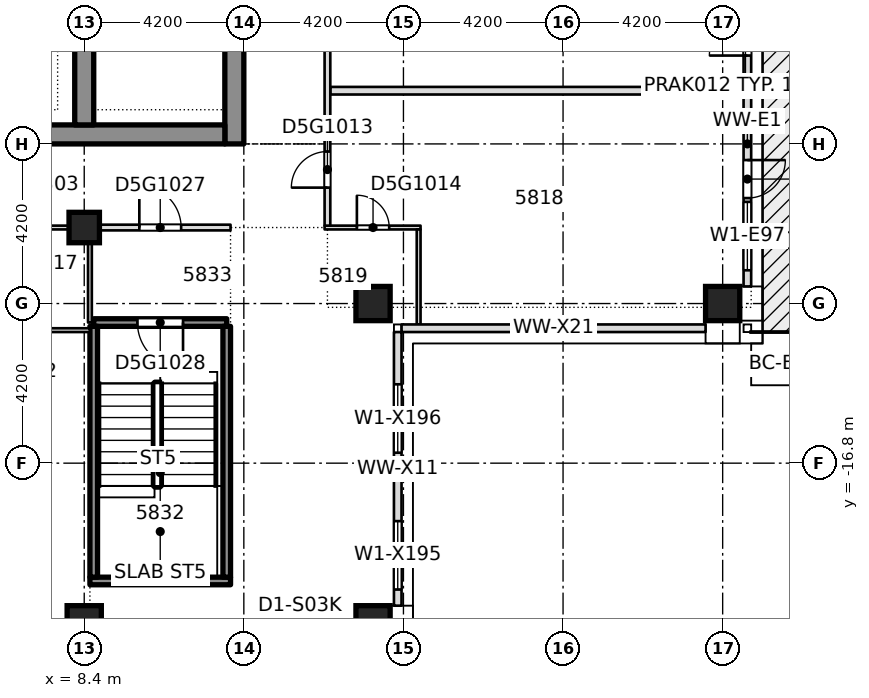
"""IFC4 building model, lengths in metres.
Left out: names, types, materials, properties, quantities, classifications, styles, units other than length and angle.
Written with IfcOpenShell. Run it as: python <this file> out.ifc"""

import sys

from ifc_helpers import new_model, si_unit, direction, frame, frame_2d, origin, origin_2d, place, context, subcontext, project, spatial, rectangle, extrude, element, fill, save


model = new_model("IFC4")
c1 = context("Model", 3, precision=1e-05, world=origin(), true_north=direction((0.0, 1.0)))
c2 = subcontext(c1, "Body", "Model", "MODEL_VIEW")
j1 = project(units=[si_unit("LENGTHUNIT", "METRE"), si_unit("PLANEANGLEUNIT", "RADIAN")], contexts=[c1])
p1 = place(None, origin())
s1 = spatial("IfcSite", under=j1, at=p1, CompositionType="ELEMENT")
p2 = place(p1, origin())
s2 = spatial("IfcBuilding", under=s1, at=p2, CompositionType="ELEMENT")
p3 = place(p2, frame((0.0, 0.0, 223.45)))
s3 = spatial("IfcBuildingStorey", under=s2, at=p3, CompositionType="ELEMENT", Elevation=223.45)
p4 = place(p3, frame((12.35, -8.4, -0.4), z_axis=(0.0, 0.0, 1.0), x_axis=(0.0, 1.0, 0.0)))
e1 = element("IfcWall", 1, at=p4, inside=s3, PredefinedType="SHEAR", context=c2, shape_type="SweptSolid", body=[
    extrude(rectangle(XDim=30.15, YDim=0.5, at=frame_2d((15.075, 0.0))), origin(), (0.0, 0.0, 1.0), 3.45),
])
p5 = place(p4, frame((4.113, 0.0, 0.4)))
e2 = element("IfcOpeningElement", 2, at=p5, cuts=e1, PredefinedType="OPENING", context=c2, shape_type="SweptSolid", body=[
    extrude(rectangle(XDim=0.95, YDim=2.1, at=frame_2d((0.475, 1.05))), frame((0.0, 0.26, 0.0), z_axis=(0.0, -1.0, 0.0), x_axis=(1.0, 0.0, 0.0)), (0.0, 0.0, 1.0), 0.52),
])
p6 = place(p4, frame((9.89, 0.0, 0.4)))
e3 = element("IfcOpeningElement", 3, at=p6, cuts=e1, PredefinedType="OPENING", context=c2, shape_type="SweptSolid", body=[
    extrude(rectangle(XDim=0.95, YDim=2.1, at=frame_2d((0.475, 1.05))), frame((0.0, 0.26, 0.0), z_axis=(0.0, -1.0, 0.0), x_axis=(1.0, 0.0, 0.0)), (0.0, 0.0, 1.0), 0.52),
])
p7 = place(p4, frame((15.052, 0.0, 0.4)))
e4 = element("IfcOpeningElement", 4, at=p7, cuts=e1, PredefinedType="OPENING", context=c2, shape_type="SweptSolid", body=[
    extrude(rectangle(XDim=0.95, YDim=2.1, at=frame_2d((0.475, 1.05))), frame((0.0, 0.26, 0.0), z_axis=(0.0, -1.0, 0.0), x_axis=(1.0, 0.0, 0.0)), (0.0, 0.0, 1.0), 0.52),
])
p8 = place(p4, frame((22.144, 0.0, 0.4)))
e5 = element("IfcOpeningElement", 5, at=p8, cuts=e1, PredefinedType="OPENING", context=c2, shape_type="SweptSolid", body=[
    extrude(rectangle(XDim=0.95, YDim=2.1, at=frame_2d((0.475, 1.05))), frame((0.0, 0.26, 0.0), z_axis=(0.0, -1.0, 0.0), x_axis=(1.0, 0.0, 0.0)), (0.0, 0.0, 1.0), 0.52),
])
p9 = place(p4, frame((24.998, 0.0, 0.4)))
e6 = element("IfcOpeningElement", 6, at=p9, cuts=e1, PredefinedType="OPENING", context=c2, shape_type="SweptSolid", body=[
    extrude(rectangle(XDim=0.95, YDim=2.1, at=frame_2d((0.475, 1.05))), frame((0.0, 0.26, 0.0), z_axis=(0.0, -1.0, 0.0), x_axis=(1.0, 0.0, 0.0)), (0.0, 0.0, 1.0), 0.52),
])
p10 = place(p4, frame((27.605, 0.0, 0.4)))
e7 = element("IfcOpeningElement", 7, at=p10, cuts=e1, PredefinedType="OPENING", context=c2, shape_type="SweptSolid", body=[
    extrude(rectangle(XDim=0.95, YDim=2.1, at=frame_2d((0.475, 1.05))), frame((0.0, 0.26, 0.0), z_axis=(0.0, -1.0, 0.0), x_axis=(1.0, 0.0, 0.0)), (0.0, 0.0, 1.0), 0.52),
])
p11 = place(p4, frame((19.3, 0.0, 0.4)))
e8 = element("IfcOpeningElement", 8, at=p11, cuts=e1, PredefinedType="OPENING", context=c2, shape_type="SweptSolid", body=[
    extrude(rectangle(XDim=1.2, YDim=2.1, at=frame_2d((0.6, 1.05))), frame((0.0, 0.26, 0.0), z_axis=(0.0, -1.0, 0.0), x_axis=(1.0, 0.0, 0.0)), (0.0, 0.0, 1.0), 0.52),
])
p12 = place(p3, frame((-12.1, -8.15, -0.4), z_axis=(0.0, 0.0, 1.0), x_axis=(1.0, 0.0, 0.0)))
e9 = element("IfcWall", 9, at=p12, inside=s3, PredefinedType="SHEAR", context=c2, shape_type="SweptSolid", body=[
    extrude(rectangle(XDim=24.2, YDim=0.5, at=frame_2d((12.1, 0.0))), origin(), (0.0, 0.0, 1.0), 3.45),
])
p13 = place(p12, frame((7.35, 0.0, 0.4)))
e10 = element("IfcOpeningElement", 10, at=p13, cuts=e9, PredefinedType="OPENING", context=c2, shape_type="SweptSolid", body=[
    extrude(rectangle(XDim=1.8, YDim=2.1, at=frame_2d((0.9, 1.05))), frame((0.0, 0.26, 0.0), z_axis=(0.0, -1.0, 0.0), x_axis=(1.0, 0.0, 0.0)), (0.0, 0.0, 1.0), 0.52),
])
p14 = place(p12, frame((15.05, 0.0, 0.4)))
e11 = element("IfcOpeningElement", 11, at=p14, cuts=e9, PredefinedType="OPENING", context=c2, shape_type="SweptSolid", body=[
    extrude(rectangle(XDim=1.8, YDim=2.1, at=frame_2d((0.9, 1.05))), frame((0.0, 0.26, 0.0), z_axis=(0.0, -1.0, 0.0), x_axis=(1.0, 0.0, 0.0)), (0.0, 0.0, 1.0), 0.52),
])
p15 = place(p3, frame((8.4, -7.9, -0.4), z_axis=(0.0, 0.0, 1.0), x_axis=(0.0, 1.0, 0.0)))
e12 = element("IfcWall", 12, at=p15, inside=s3, PredefinedType="SHEAR", context=c2, shape_type="SweptSolid", body=[
    extrude(rectangle(XDim=29.15, YDim=0.5, at=frame_2d((14.575, 0.0))), origin(), (0.0, 0.0, 1.0), 3.45),
])
p16 = place(p15, frame((18.8, 0.0, 0.4)))
e13 = element("IfcOpeningElement", 13, at=p16, cuts=e12, PredefinedType="OPENING", context=c2, shape_type="SweptSolid", body=[
    extrude(rectangle(XDim=1.2, YDim=2.1, at=frame_2d((0.6, 1.05))), frame((0.0, 0.26, 0.0), z_axis=(0.0, -1.0, 0.0), x_axis=(1.0, 0.0, 0.0)), (0.0, 0.0, 1.0), 0.52),
])
for number, where, z_axis, x_axis in (
    (14, (8.4, -21.0, -0.4), (0.0, 0.0, 1.0), (1.0, 0.0, 0.0)),
    (15, (16.0, -21.0, -0.4), (0.0, 0.0, 1.0), (1.0, 0.0, 0.0)),
    (16, (16.0, -12.6, -0.4), (0.0, 0.0, 1.0), (1.0, 0.0, 0.0)),
    (17, (25.2, -12.6, -0.4), (0.0, 0.0, 1.0), (1.0, 0.0, 0.0)),
):
    element("IfcColumn", number, at=place(p3, frame(where, z_axis=z_axis, x_axis=x_axis)), inside=s3, PredefinedType="COLUMN", context=c2, shape_type="SweptSolid", body=[
        extrude(rectangle(XDim=0.9, YDim=0.9, at=origin_2d()), origin(), (0.0, 0.0, 1.0), 3.45),
    ])
p17 = place(p3, frame((8.4, -10.6, -0.4), z_axis=(0.0, 0.0, 1.0), x_axis=(1.0, 0.0, 0.0)))
e18 = element("IfcColumn", 18, at=p17, inside=s3, PredefinedType="COLUMN", context=c2, shape_type="SweptSolid", body=[
    extrude(rectangle(XDim=0.8, YDim=0.8, at=origin_2d()), origin(), (0.0, 0.0, 1.0), 3.45),
])
p18 = place(p3, frame((5.802, -13.3, 0.0), z_axis=(0.0, 0.0, 1.0), x_axis=(1.0, 0.0, 0.0)))
e19 = element("IfcWall", 19, at=p18, inside=s3, PredefinedType="PARTITIONING", context=c2, shape_type="SweptSolid", body=[
    extrude(rectangle(XDim=2.748, YDim=0.1, at=frame_2d((1.374, 0.0))), origin(), (0.0, 0.0, 1.0), 3.05),
])
p19 = place(p18, frame((0.248, 0.0, 0.0)))
e20 = element("IfcOpeningElement", 20, at=p19, cuts=e19, PredefinedType="OPENING", context=c2, shape_type="SweptSolid", body=[
    extrude(rectangle(XDim=0.85, YDim=2.1, at=frame_2d((0.425, 1.05))), frame((0.0, 0.06, 0.0), z_axis=(0.0, -1.0, 0.0), x_axis=(1.0, 0.0, 0.0)), (0.0, 0.0, 1.0), 0.12),
])
p20 = place(p3, frame((8.65, -13.1, 0.0), z_axis=(0.0, 0.0, 1.0), x_axis=(1.0, 0.0, 0.0)))
e21 = element("IfcWall", 21, at=p20, inside=s3, PredefinedType="SOLIDWALL", context=c2, shape_type="SweptSolid", body=[
    extrude(rectangle(XDim=3.5, YDim=0.2, at=frame_2d((1.75, 0.0))), origin(), (0.0, 0.0, 1.0), 3.05),
])
p21 = place(p20, frame((1.15, 0.0, 0.0)))
e22 = element("IfcOpeningElement", 22, at=p21, cuts=e21, PredefinedType="OPENING", context=c2, shape_type="SweptSolid", body=[
    extrude(rectangle(XDim=1.2, YDim=2.1, at=frame_2d((0.6, 1.05))), frame((0.0, 0.11, 0.0), z_axis=(0.0, -1.0, 0.0), x_axis=(1.0, 0.0, 0.0)), (0.0, 0.0, 1.0), 0.22),
])
p22 = place(p3, frame((5.8, -10.6, 0.0), z_axis=(0.0, 0.0, 1.0), x_axis=(1.0, 0.0, 0.0)))
e23 = element("IfcWall", 23, at=p22, inside=s3, PredefinedType="PARTITIONING", context=c2, shape_type="SweptSolid", body=[
    extrude(rectangle(XDim=2.8, YDim=0.1, at=frame_2d((1.4, 0.0))), origin(), (0.0, 0.0, 1.0), 3.05),
])
p23 = place(p3, frame((8.5, -10.6, 0.0), z_axis=(0.0, 0.0, 1.0), x_axis=(1.0, 0.0, 0.0)))
e24 = element("IfcWall", 24, at=p23, inside=s3, PredefinedType="PARTITIONING", context=c2, shape_type="SweptSolid", body=[
    extrude(rectangle(XDim=3.75, YDim=0.15, at=frame_2d((1.875, 0.0))), origin(), (0.0, 0.0, 1.0), 3.05),
])
p24 = place(p23, frame((1.35, 0.0, 0.0)))
e25 = element("IfcOpeningElement", 25, at=p24, cuts=e24, PredefinedType="OPENING", context=c2, shape_type="SweptSolid", body=[
    extrude(rectangle(XDim=1.1, YDim=2.1, at=frame_2d((0.55, 1.05))), frame((0.0, 0.085, 0.0), z_axis=(0.0, -1.0, 0.0), x_axis=(1.0, 0.0, 0.0)), (0.0, 0.0, 1.0), 0.17),
])
p25 = place(p3, frame((14.725, -10.6, 0.0), z_axis=(0.0, 0.0, 1.0), x_axis=(1.0, 0.0, 0.0)))
e26 = element("IfcWall", 26, at=p25, inside=s3, PredefinedType="PARTITIONING", context=c2, shape_type="SweptSolid", body=[
    extrude(rectangle(XDim=2.525, YDim=0.1, at=frame_2d((1.262, 0.0))), origin(), (0.0, 0.0, 1.0), 3.05),
])
p26 = place(p25, frame((0.85, 0.0, 0.0)))
e27 = element("IfcOpeningElement", 27, at=p26, cuts=e26, PredefinedType="OPENING", context=c2, shape_type="SweptSolid", body=[
    extrude(rectangle(XDim=0.85, YDim=2.1, at=frame_2d((0.425, 1.05))), frame((0.0, 0.06, 0.0), z_axis=(0.0, -1.0, 0.0), x_axis=(1.0, 0.0, 0.0)), (0.0, 0.0, 1.0), 0.12),
])
p27 = place(p3, frame((14.875, -7.0, 0.0), z_axis=(0.0, 0.0, 1.0), x_axis=(1.0, 0.0, 0.0)))
e28 = element("IfcWall", 28, at=p27, inside=s3, PredefinedType="PARTITIONING", context=c2, shape_type="SweptSolid", body=[
    extrude(rectangle(XDim=10.875, YDim=0.2, at=frame_2d((5.438, 0.0))), origin(), (0.0, 0.0, 1.0), 3.05),
])
p28 = place(p3, frame((8.55, -13.1, 0.0), z_axis=(0.0, 0.0, 1.0), x_axis=(0.0, 1.0, 0.0)))
e29 = element("IfcWall", 29, at=p28, inside=s3, PredefinedType="PARTITIONING", context=c2, shape_type="SweptSolid", body=[
    extrude(rectangle(XDim=2.425, YDim=0.1, at=frame_2d((1.212, 0.0))), origin(), (0.0, 0.0, 1.0), 3.05),
])
p29 = place(p3, frame((14.8, -10.55, 0.0), z_axis=(0.0, 0.0, 1.0), x_axis=(0.0, 1.0, 0.0)))
e30 = element("IfcWall", 30, at=p29, inside=s3, PredefinedType="PARTITIONING", context=c2, shape_type="SweptSolid", body=[
    extrude(rectangle(XDim=20.975, YDim=0.15, at=frame_2d((10.488, 0.0))), origin(), (0.0, 0.0, 1.0), 3.05),
])
p30 = place(p29, frame((1.0, 0.0, 0.0)))
e31 = element("IfcOpeningElement", 31, at=p30, cuts=e30, PredefinedType="OPENING", context=c2, shape_type="SweptSolid", body=[
    extrude(rectangle(XDim=0.95, YDim=2.1, at=frame_2d((0.475, 1.05))), frame((0.0, 0.085, 0.0), z_axis=(0.0, -1.0, 0.0), x_axis=(1.0, 0.0, 0.0)), (0.0, 0.0, 1.0), 0.17),
])
p31 = place(p29, frame((17.0, 0.0, 0.0)))
e32 = element("IfcOpeningElement", 32, at=p31, cuts=e30, PredefinedType="OPENING", context=c2, shape_type="SweptSolid", body=[
    extrude(rectangle(XDim=1.0, YDim=2.1, at=frame_2d((0.5, 1.05))), frame((0.0, 0.085, 0.0), z_axis=(0.0, -1.0, 0.0), x_axis=(1.0, 0.0, 0.0)), (0.0, 0.0, 1.0), 0.17),
])
p32 = place(p29, frame((10.0, 0.0, 0.0)))
e33 = element("IfcOpeningElement", 33, at=p32, cuts=e30, PredefinedType="OPENING", context=c2, shape_type="SweptSolid", body=[
    extrude(rectangle(XDim=1.1, YDim=2.1, at=frame_2d((0.55, 1.05))), frame((0.0, 0.085, 0.0), z_axis=(0.0, -1.0, 0.0), x_axis=(1.0, 0.0, 0.0)), (0.0, 0.0, 1.0), 0.17),
])
p33 = place(p29, frame((4.85, 0.0, 0.0)))
e34 = element("IfcOpeningElement", 34, at=p33, cuts=e30, PredefinedType="OPENING", context=c2, shape_type="SweptSolid", body=[
    extrude(rectangle(XDim=1.0, YDim=2.1, at=frame_2d((0.5, 1.05))), frame((0.0, 0.085, 0.0), z_axis=(0.0, -1.0, 0.0), x_axis=(1.0, 0.0, 0.0)), (0.0, 0.0, 1.0), 0.17),
])
p34 = place(p3, frame((17.2, -13.15, 0.0), z_axis=(0.0, 0.0, 1.0), x_axis=(0.0, 1.0, 0.0)))
e35 = element("IfcWall", 35, at=p34, inside=s3, PredefinedType="PARTITIONING", context=c2, shape_type="SweptSolid", body=[
    extrude(rectangle(XDim=2.5, YDim=0.1, at=frame_2d((1.25, 0.0))), origin(), (0.0, 0.0, 1.0), 3.05),
])
p35 = place(p3, frame((16.65, -20.55, 0.0), z_axis=(0.0, 0.0, 1.0), x_axis=(0.0, 1.0, 0.0)))
e36 = element("IfcWall", 36, at=p35, inside=s3, PredefinedType="STANDARD", context=c2, shape_type="SweptSolid", body=[
    extrude(rectangle(XDim=7.2, YDim=0.2, at=frame_2d((3.6, 0.0))), origin(), (0.0, 0.0, 1.0), 3.05),
])
p36 = place(p35, frame((0.425, 0.0, 0.2)))
e37 = element("IfcOpeningElement", 37, at=p36, cuts=e36, PredefinedType="OPENING", context=c2, shape_type="SweptSolid", body=[
    extrude(rectangle(XDim=1.8, YDim=2.65, at=frame_2d((0.9, 1.325))), frame((0.0, 0.11, 0.0), z_axis=(0.0, -1.0, 0.0), x_axis=(1.0, 0.0, 0.0)), (0.0, 0.0, 1.0), 0.22),
])
p37 = place(p35, frame((4.025, 0.0, 0.2)))
e38 = element("IfcOpeningElement", 38, at=p37, cuts=e36, PredefinedType="OPENING", context=c2, shape_type="SweptSolid", body=[
    extrude(rectangle(XDim=1.8, YDim=2.65, at=frame_2d((0.9, 1.325))), frame((0.0, 0.11, 0.0), z_axis=(0.0, -1.0, 0.0), x_axis=(1.0, 0.0, 0.0)), (0.0, 0.0, 1.0), 0.22),
])
p38 = place(p3, frame((16.75, -13.25, 0.0), z_axis=(0.0, 0.0, 1.0), x_axis=(1.0, 0.0, 0.0)))
e39 = element("IfcWall", 39, at=p38, inside=s3, PredefinedType="STANDARD", context=c2, shape_type="SweptSolid", body=[
    extrude(rectangle(XDim=8.0, YDim=0.2, at=frame_2d((4.0, 0.0))), origin(), (0.0, 0.0, 1.0), 3.05),
])
p39 = place(p3, frame((25.85, -12.15, 0.0), z_axis=(0.0, 0.0, 1.0), x_axis=(0.0, 1.0, 0.0)))
e40 = element("IfcWall", 40, at=p39, inside=s3, PredefinedType="STANDARD", context=c2, shape_type="SweptSolid", body=[
    extrude(rectangle(XDim=7.5, YDim=0.2, at=frame_2d((3.75, 0.0))), origin(), (0.0, 0.0, 1.0), 3.05),
])
p40 = place(p39, frame((0.425, 0.0, 0.2)))
e41 = element("IfcOpeningElement", 41, at=p40, cuts=e40, PredefinedType="OPENING", context=c2, shape_type="SweptSolid", body=[
    extrude(rectangle(XDim=1.8, YDim=2.65, at=frame_2d((0.9, 1.325))), frame((0.0, 0.11, 0.0), z_axis=(0.0, -1.0, 0.0), x_axis=(1.0, 0.0, 0.0)), (0.0, 0.0, 1.0), 0.22),
])
p41 = place(p39, frame((2.325, 0.0, 0.0)))
e42 = element("IfcOpeningElement", 42, at=p41, cuts=e40, PredefinedType="OPENING", context=c2, shape_type="SweptSolid", body=[
    extrude(rectangle(XDim=1.0, YDim=2.4, at=frame_2d((0.5, 1.2))), frame((0.0, 0.11, 0.0), z_axis=(0.0, -1.0, 0.0), x_axis=(1.0, 0.0, 0.0)), (0.0, 0.0, 1.0), 0.22),
])
p42 = place(p39, frame((6.075, 0.0, 0.0)))
e43 = element("IfcOpeningElement", 43, at=p42, cuts=e40, PredefinedType="OPENING", context=c2, shape_type="SweptSolid", body=[
    extrude(rectangle(XDim=1.0, YDim=2.4, at=frame_2d((0.5, 1.2))), frame((0.0, 0.11, 0.0), z_axis=(0.0, -1.0, 0.0), x_axis=(1.0, 0.0, 0.0)), (0.0, 0.0, 1.0), 0.22),
])
p43 = place(p3, frame((8.55, -19.9, 0.0), z_axis=(0.0, 0.0, 1.0), x_axis=(1.0, 0.0, 0.0)))
e44 = element("IfcWall", 44, at=p43, inside=s3, PredefinedType="SOLIDWALL", context=c2, shape_type="SweptSolid", body=[
    extrude(rectangle(XDim=3.7, YDim=0.2, at=frame_2d((1.85, 0.0))), origin(), (0.0, 0.0, 1.0), 3.05),
])
for number, where, z_axis, x_axis in (
    (45, (8.65, -19.8, 0.0), (0.0, 0.0, 1.0), (0.0, 1.0, 0.0)),
    (46, (12.15, -19.8, 0.0), (0.0, 0.0, 1.0), (0.0, 1.0, 0.0)),
):
    element("IfcWall", number, at=place(p3, frame(where, z_axis=z_axis, x_axis=x_axis)), inside=s3, PredefinedType="SOLIDWALL", context=c2, shape_type="SweptSolid", body=[
        extrude(rectangle(XDim=6.6, YDim=0.2, at=frame_2d((3.3, 0.0))), origin(), (0.0, 0.0, 1.0), 3.05),
    ])
p44 = place(p30, origin())
e47 = element("IfcDoor", 47, at=p44, inside=s3, OperationType="SINGLE_SWING_RIGHT", PredefinedType="DOOR", context=c2, shape_type="SweptSolid", body=[
    extrude(rectangle(XDim=0.95, YDim=2.1, at=frame_2d((0.475, 1.05))), frame((0.0, 0.025, 0.0), z_axis=(0.0, -1.0, 0.0), x_axis=(1.0, 0.0, 0.0)), (0.0, 0.0, 1.0), 0.05),
])
fill(e31, e47)
p45 = place(p26, origin())
e48 = element("IfcDoor", 48, at=p45, inside=s3, OperationType="SINGLE_SWING_RIGHT", PredefinedType="DOOR", context=c2, shape_type="SweptSolid", body=[
    extrude(rectangle(XDim=0.85, YDim=2.1, at=frame_2d((0.425, 1.05))), frame((0.0, 0.025, 0.0), z_axis=(0.0, -1.0, 0.0), x_axis=(1.0, 0.0, 0.0)), (0.0, 0.0, 1.0), 0.05),
])
fill(e27, e48)
p46 = place(p24, origin())
e49 = element("IfcDoor", 49, at=p46, inside=s3, OperationType="SINGLE_SWING_RIGHT", PredefinedType="DOOR", context=c2, shape_type="SweptSolid", body=[
    extrude(rectangle(XDim=1.1, YDim=2.1, at=frame_2d((0.55, 1.05))), frame((0.0, 0.025, 0.0), z_axis=(0.0, -1.0, 0.0), x_axis=(1.0, 0.0, 0.0)), (0.0, 0.0, 1.0), 0.05),
])
fill(e25, e49)
p47 = place(p21, origin())
e50 = element("IfcDoor", 50, at=p47, inside=s3, OperationType="SINGLE_SWING_RIGHT", PredefinedType="DOOR", context=c2, shape_type="SweptSolid", body=[
    extrude(rectangle(XDim=1.2, YDim=2.1, at=frame_2d((0.6, 1.05))), frame((0.0, 0.025, 0.0), z_axis=(0.0, -1.0, 0.0), x_axis=(1.0, 0.0, 0.0)), (0.0, 0.0, 1.0), 0.05),
])
fill(e22, e50)
p48 = place(p36, origin())
e51 = element("IfcWindow", 51, at=p48, inside=s3, PartitioningType="SINGLE_PANEL", PredefinedType="WINDOW", context=c2, shape_type="SweptSolid", body=[
    extrude(rectangle(XDim=1.8, YDim=2.65, at=frame_2d((0.9, 1.325))), frame((0.0, 0.03, 0.0), z_axis=(0.0, -1.0, 0.0), x_axis=(1.0, 0.0, 0.0)), (0.0, 0.0, 1.0), 0.06),
])
fill(e37, e51)
p49 = place(p37, origin())
e52 = element("IfcWindow", 52, at=p49, inside=s3, PartitioningType="SINGLE_PANEL", PredefinedType="WINDOW", context=c2, shape_type="SweptSolid", body=[
    extrude(rectangle(XDim=1.8, YDim=2.65, at=frame_2d((0.9, 1.325))), frame((0.0, 0.03, 0.0), z_axis=(0.0, -1.0, 0.0), x_axis=(1.0, 0.0, 0.0)), (0.0, 0.0, 1.0), 0.06),
])
fill(e38, e52)
p50 = place(p40, origin())
e53 = element("IfcWindow", 53, at=p50, inside=s3, PartitioningType="SINGLE_PANEL", PredefinedType="WINDOW", context=c2, shape_type="SweptSolid", body=[
    extrude(rectangle(XDim=1.8, YDim=2.65, at=frame_2d((0.9, 1.325))), frame((0.0, 0.03, 0.0), z_axis=(0.0, -1.0, 0.0), x_axis=(1.0, 0.0, 0.0)), (0.0, 0.0, 1.0), 0.06),
])
fill(e41, e53)
p51 = place(p41, origin())
e54 = element("IfcDoor", 54, at=p51, inside=s3, OperationType="SINGLE_SWING_LEFT", PredefinedType="DOOR", context=c2, shape_type="SweptSolid", body=[
    extrude(rectangle(XDim=1.0, YDim=2.4, at=frame_2d((0.5, 1.2))), frame((0.0, 0.025, 0.0), z_axis=(0.0, -1.0, 0.0), x_axis=(1.0, 0.0, 0.0)), (0.0, 0.0, 1.0), 0.05),
])
fill(e42, e54)
p52 = place(p42, origin())
e55 = element("IfcDoor", 55, at=p52, inside=s3, OperationType="SINGLE_SWING_LEFT", PredefinedType="DOOR", context=c2, shape_type="SweptSolid", body=[
    extrude(rectangle(XDim=1.0, YDim=2.4, at=frame_2d((0.5, 1.2))), frame((0.0, 0.025, 0.0), z_axis=(0.0, -1.0, 0.0), x_axis=(1.0, 0.0, 0.0)), (0.0, 0.0, 1.0), 0.05),
])
fill(e43, e55)
save(model, sys.argv[1])
